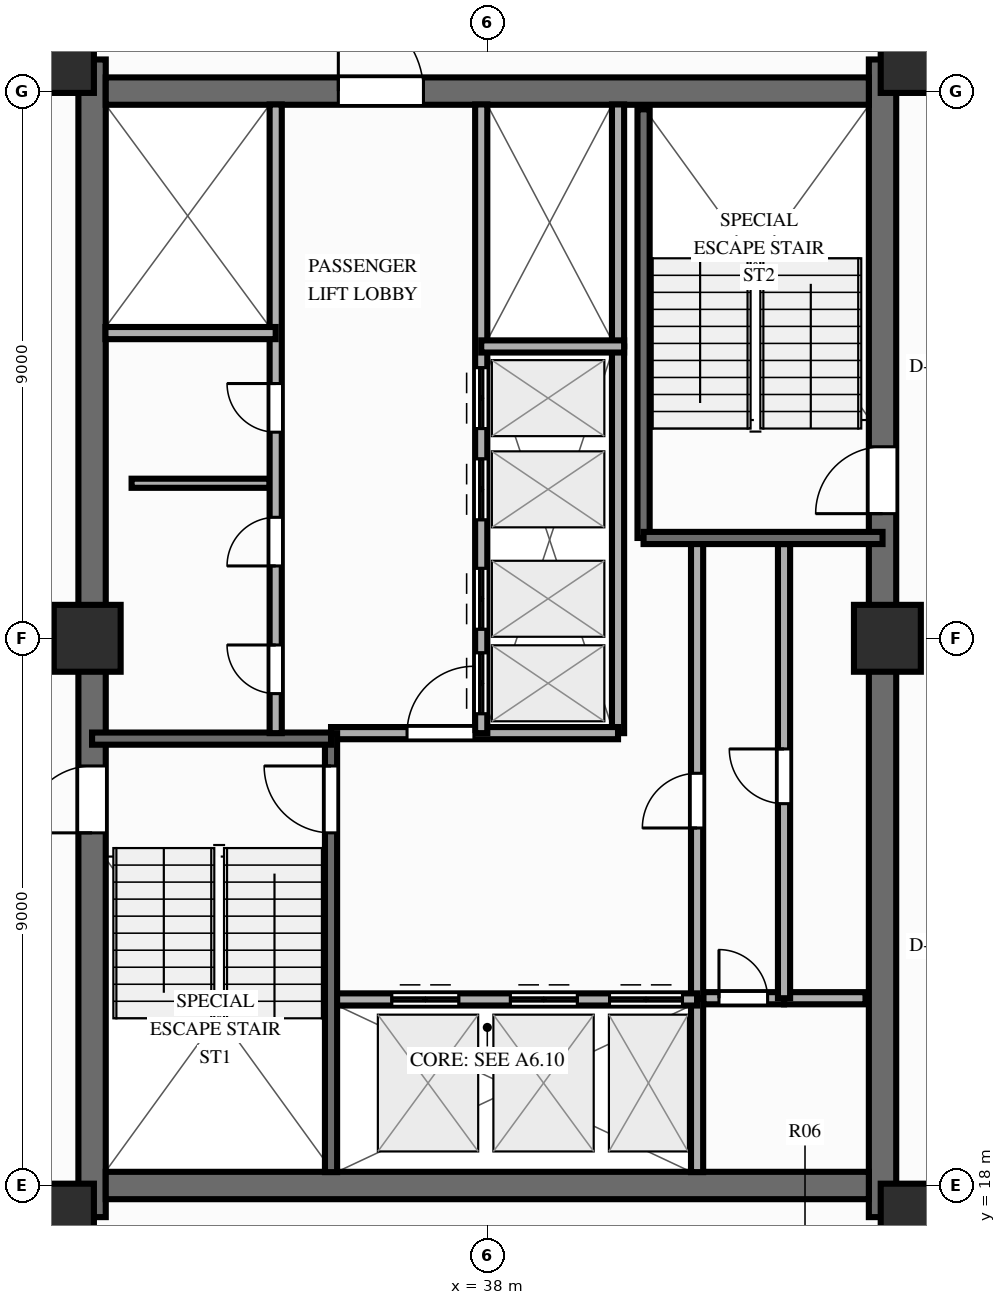
"""IFC4 building model, lengths in metres.
Left out: names, types, materials, properties, quantities, classifications, styles, units other than length and angle.
Written with IfcOpenShell. Run it as: python <this file> out.ifc"""

import sys

from ifc_helpers import new_model, si_unit, direction, frame, frame_2d, origin, origin_2d, place, context, subcontext, project, spatial, rectangle, extrude, source, transform, mapped, element, fill, save


model = new_model("IFC4")
c1 = context("Model", 3, precision=1e-05, world=origin(), true_north=direction((0.0, 1.0)))
c2 = subcontext(c1, "Body", "Model", "MODEL_VIEW")
j1 = project(units=[si_unit("LENGTHUNIT", "METRE"), si_unit("PLANEANGLEUNIT", "RADIAN")], contexts=[c1])
p1 = place(None, origin())
s1 = spatial("IfcSite", under=j1, at=p1, CompositionType="ELEMENT")
p2 = place(p1, origin())
s2 = spatial("IfcBuilding", under=s1, at=p2, CompositionType="ELEMENT")
p3 = place(p2, frame((0.0, 0.0, 159.1)))
s3 = spatial("IfcBuildingStorey", under=s2, at=p3, CompositionType="ELEMENT", Elevation=159.1)
p4 = place(p3, frame((31.5, 17.48, 0.0), z_axis=(0.0, 0.0, 1.0), x_axis=(0.0, 1.0, 0.0)))
e1 = element("IfcWall", 1, at=p4, inside=s3, PredefinedType="SHEAR", context=c2, shape_type="SweptSolid", body=[
    extrude(rectangle(XDim=19.04, YDim=0.45, at=frame_2d((9.52, 0.0))), origin(), (0.0, 0.0, 1.0), 3.9),
])
p5 = place(p4, frame((6.32, 0.0, 0.0)))
e2 = element("IfcOpeningElement", 2, at=p5, cuts=e1, PredefinedType="OPENING", context=c2, shape_type="SweptSolid", body=[
    extrude(rectangle(XDim=1.1, YDim=2.15, at=frame_2d((0.55, 1.075))), frame((0.0, 0.237, 0.0), z_axis=(0.0, -1.0, 0.0), x_axis=(1.0, 0.0, 0.0)), (0.0, 0.0, 1.0), 0.474),
])
p6 = place(p3, frame((44.5, 17.48, 0.0), z_axis=(0.0, 0.0, 1.0), x_axis=(0.0, 1.0, 0.0)))
e3 = element("IfcWall", 3, at=p6, inside=s3, PredefinedType="SHEAR", context=c2, shape_type="SweptSolid", body=[
    extrude(rectangle(XDim=19.04, YDim=0.45, at=frame_2d((9.52, 0.0))), origin(), (0.0, 0.0, 1.0), 3.9),
])
p7 = place(p6, frame((12.67, 0.0, 0.0), z_axis=(0.0, 0.0, 1.0), x_axis=(-1.0, 0.0, 0.0)))
e4 = element("IfcOpeningElement", 4, at=p7, cuts=e3, PredefinedType="OPENING", context=c2, shape_type="SweptSolid", body=[
    extrude(rectangle(XDim=1.1, YDim=2.15, at=frame_2d((0.55, 1.075))), frame((0.0, 0.237, 0.0), z_axis=(0.0, -1.0, 0.0), x_axis=(1.0, 0.0, 0.0)), (0.0, 0.0, 1.0), 0.474),
])
p8 = place(p3, frame((31.725, 18.0, 0.0), z_axis=(0.0, 0.0, 1.0), x_axis=(1.0, 0.0, 0.0)))
e5 = element("IfcWall", 5, at=p8, inside=s3, PredefinedType="SHEAR", context=c2, shape_type="SweptSolid", body=[
    extrude(rectangle(XDim=12.55, YDim=0.45, at=frame_2d((6.275, 0.0))), origin(), (0.0, 0.0, 1.0), 3.9),
])
p9 = place(p3, frame((31.725, 36.0, 0.0), z_axis=(0.0, 0.0, 1.0), x_axis=(1.0, 0.0, 0.0)))
e6 = element("IfcWall", 6, at=p9, inside=s3, PredefinedType="SHEAR", context=c2, shape_type="SweptSolid", body=[
    extrude(rectangle(XDim=12.55, YDim=0.45, at=frame_2d((6.275, 0.0))), origin(), (0.0, 0.0, 1.0), 3.9),
])
p10 = place(p9, frame((5.225, 0.0, 0.0), z_axis=(0.0, 0.0, 1.0), x_axis=(-1.0, 0.0, 0.0)))
e7 = element("IfcOpeningElement", 7, at=p10, cuts=e6, PredefinedType="OPENING", context=c2, shape_type="SweptSolid", body=[
    extrude(rectangle(XDim=1.4, YDim=2.15, at=frame_2d((0.7, 1.075))), frame((0.0, 0.237, 0.0), z_axis=(0.0, -1.0, 0.0), x_axis=(1.0, 0.0, 0.0)), (0.0, 0.0, 1.0), 0.474),
])
m1 = source(origin(), c2, "Body", "SweptSolid", [
    extrude(rectangle(XDim=1.1, YDim=1.1, at=origin_2d()), origin(), (0.0, 0.0, 1.0), 3.9),
])
for number, where, z_axis, x_axis in (
    (8, (30.98, 17.48, 0.0), (0.0, 0.0, 1.0), (1.0, 0.0, 0.0)),
    (9, (45.02, 17.48, 0.0), (0.0, 0.0, 1.0), (1.0, 0.0, 0.0)),
    (10, (30.98, 36.52, 0.0), (0.0, 0.0, 1.0), (1.0, 0.0, 0.0)),
    (11, (45.02, 36.52, 0.0), (0.0, 0.0, 1.0), (1.0, 0.0, 0.0)),
    (12, (31.42, 27.0, 0.0), (0.0, 0.0, 1.0), (1.0, 0.0, 0.0)),
    (13, (44.58, 27.0, 0.0), (0.0, 0.0, 1.0), (1.0, 0.0, 0.0)),
):
    element("IfcColumn", number, at=place(p3, frame(where, z_axis=z_axis, x_axis=x_axis)), inside=s3, PredefinedType="COLUMN", context=c2, shape_type="MappedRepresentation", body=[
        mapped(m1, transform((0.0, 0.0, 0.0), scale=1.0)),
    ])
p11 = place(p3, frame((32.15, 29.55, 0.0), z_axis=(0.0, 0.0, 1.0), x_axis=(1.0, 0.0, 0.0)))
e14 = element("IfcWall", 14, at=p11, inside=s3, PredefinedType="PARTITIONING", context=c2, shape_type="SweptSolid", body=[
    extrude(rectangle(XDim=2.27, YDim=0.15, at=frame_2d((1.135, 0.0))), origin(), (0.0, 0.0, 1.0), 3.69),
])
p12 = place(p3, frame((41.55, 21.08, 0.0), z_axis=(0.0, 0.0, 1.0), x_axis=(1.0, 0.0, 0.0)))
e15 = element("IfcWall", 15, at=p12, inside=s3, PredefinedType="PARTITIONING", context=c2, shape_type="SweptSolid", body=[
    extrude(rectangle(XDim=1.33, YDim=0.2, at=frame_2d((0.665, 0.0))), origin(), (0.0, 0.0, 1.0), 3.69),
])
p13 = place(p12, frame((0.26, 0.0, 0.0)))
e16 = element("IfcOpeningElement", 16, at=p13, cuts=e15, PredefinedType="OPENING", context=c2, shape_type="SweptSolid", body=[
    extrude(rectangle(XDim=0.8, YDim=2.05, at=frame_2d((0.4, 1.025))), frame((0.0, 0.112, 0.0), z_axis=(0.0, -1.0, 0.0), x_axis=(1.0, 0.0, 0.0)), (0.0, 0.0, 1.0), 0.224),
])
p14 = place(p3, frame((42.88, 21.08, 0.0), z_axis=(0.0, 0.0, 1.0), x_axis=(1.0, 0.0, 0.0)))
e17 = element("IfcWall", 17, at=p14, inside=s3, PredefinedType="PARTITIONING", context=c2, shape_type="SweptSolid", body=[
    extrude(rectangle(XDim=1.34, YDim=0.2, at=frame_2d((0.67, 0.0))), origin(), (0.0, 0.0, 1.0), 3.69),
])
p15 = place(p3, frame((42.88, 21.08, 0.0), z_axis=(0.0, 0.0, 1.0), x_axis=(0.0, 1.0, 0.0)))
e18 = element("IfcWall", 18, at=p15, inside=s3, PredefinedType="PARTITIONING", context=c2, shape_type="SweptSolid", body=[
    extrude(rectangle(XDim=7.47, YDim=0.2, at=frame_2d((3.735, 0.0))), origin(), (0.0, 0.0, 1.0), 3.69),
])
p16 = place(p15, frame((3.2, 0.0, 0.0)))
e19 = element("IfcOpeningElement", 19, at=p16, cuts=e18, PredefinedType="OPENING", context=c2, shape_type="SweptSolid", body=[
    extrude(rectangle(XDim=0.9, YDim=2.1, at=frame_2d((0.45, 1.05))), frame((0.0, 0.112, 0.0), z_axis=(0.0, -1.0, 0.0), x_axis=(1.0, 0.0, 0.0)), (0.0, 0.0, 1.0), 0.224),
])
p17 = place(p3, frame((41.45, 18.22, 0.0), z_axis=(0.0, 0.0, 1.0), x_axis=(0.0, 1.0, 0.0)))
e20 = element("IfcWall", 20, at=p17, inside=s3, PredefinedType="PARTITIONING", context=c2, shape_type="SweptSolid", body=[
    extrude(rectangle(XDim=2.86, YDim=0.2, at=frame_2d((1.43, 0.0))), origin(), (0.0, 0.0, 1.0), 3.69),
])
p18 = place(p3, frame((41.45, 21.08, 0.0), z_axis=(0.0, 0.0, 1.0), x_axis=(0.0, 1.0, 0.0)))
e21 = element("IfcWall", 21, at=p18, inside=s3, PredefinedType="PARTITIONING", context=c2, shape_type="SweptSolid", body=[
    extrude(rectangle(XDim=7.52, YDim=0.2, at=frame_2d((3.76, 0.0))), origin(), (0.0, 0.0, 1.0), 3.69),
])
p19 = place(p18, frame((2.8, 0.0, 0.0)))
e22 = element("IfcOpeningElement", 22, at=p19, cuts=e21, PredefinedType="OPENING", context=c2, shape_type="SweptSolid", body=[
    extrude(rectangle(XDim=0.9, YDim=2.1, at=frame_2d((0.45, 1.05))), frame((0.0, 0.112, 0.0), z_axis=(0.0, -1.0, 0.0), x_axis=(1.0, 0.0, 0.0)), (0.0, 0.0, 1.0), 0.224),
])
p20 = place(p3, frame((40.15, 25.44, 0.0), z_axis=(0.0, 0.0, 1.0), x_axis=(0.0, 1.0, 0.0)))
e23 = element("IfcWall", 23, at=p20, inside=s3, PredefinedType="PARTITIONING", context=c2, shape_type="SweptSolid", body=[
    extrude(rectangle(XDim=6.36, YDim=0.2, at=frame_2d((3.18, 0.0))), origin(), (0.0, 0.0, 1.0), 3.69),
])
p21 = place(p3, frame((40.15, 31.8, 0.0), z_axis=(0.0, 0.0, 1.0), x_axis=(0.0, 1.0, 0.0)))
e24 = element("IfcWall", 24, at=p21, inside=s3, PredefinedType="PARTITIONING", context=c2, shape_type="SweptSolid", body=[
    extrude(rectangle(XDim=3.98, YDim=0.2, at=frame_2d((1.99, 0.0))), origin(), (0.0, 0.0, 1.0), 3.69),
])
p22 = place(p3, frame((35.43, 21.06, 0.0), z_axis=(0.0, 0.0, 1.0), x_axis=(1.0, 0.0, 0.0)))
e25 = element("IfcWall", 25, at=p22, inside=s3, PredefinedType="PARTITIONING", context=c2, shape_type="SweptSolid", body=[
    extrude(rectangle(XDim=6.02, YDim=0.2, at=frame_2d((3.01, 0.0))), origin(), (0.0, 0.0, 1.0), 3.69),
])
p23 = place(p22, frame((1.0, 0.0, 0.0)))
e26 = element("IfcOpeningElement", 26, at=p23, cuts=e25, PredefinedType="OPENING", context=c2, shape_type="SweptSolid", body=[
    extrude(rectangle(XDim=1.1, YDim=2.15, at=frame_2d((0.55, 1.075))), frame((0.0, 0.112, 0.0), z_axis=(0.0, -1.0, 0.0), x_axis=(1.0, 0.0, 0.0)), (0.0, 0.0, 1.0), 0.224),
])
p24 = place(p22, frame((2.95, 0.0, 0.0)))
e27 = element("IfcOpeningElement", 27, at=p24, cuts=e25, PredefinedType="OPENING", context=c2, shape_type="SweptSolid", body=[
    extrude(rectangle(XDim=1.1, YDim=2.15, at=frame_2d((0.55, 1.075))), frame((0.0, 0.112, 0.0), z_axis=(0.0, -1.0, 0.0), x_axis=(1.0, 0.0, 0.0)), (0.0, 0.0, 1.0), 0.224),
])
p25 = place(p22, frame((4.58, 0.0, 0.0)))
e28 = element("IfcOpeningElement", 28, at=p25, cuts=e25, PredefinedType="OPENING", context=c2, shape_type="SweptSolid", body=[
    extrude(rectangle(XDim=1.2, YDim=2.15, at=frame_2d((0.6, 1.075))), frame((0.0, 0.112, 0.0), z_axis=(0.0, -1.0, 0.0), x_axis=(1.0, 0.0, 0.0)), (0.0, 0.0, 1.0), 0.224),
])
p26 = place(p3, frame((35.43, 25.44, 0.0), z_axis=(0.0, 0.0, 1.0), x_axis=(1.0, 0.0, 0.0)))
e29 = element("IfcWall", 29, at=p26, inside=s3, PredefinedType="PARTITIONING", context=c2, shape_type="SweptSolid", body=[
    extrude(rectangle(XDim=4.72, YDim=0.2, at=frame_2d((2.36, 0.0))), origin(), (0.0, 0.0, 1.0), 3.69),
])
p27 = place(p26, frame((1.25, 0.0, 0.0)))
e30 = element("IfcOpeningElement", 30, at=p27, cuts=e29, PredefinedType="OPENING", context=c2, shape_type="SweptSolid", body=[
    extrude(rectangle(XDim=1.1, YDim=2.15, at=frame_2d((0.55, 1.075))), frame((0.0, 0.112, 0.0), z_axis=(0.0, -1.0, 0.0), x_axis=(1.0, 0.0, 0.0)), (0.0, 0.0, 1.0), 0.224),
])
p28 = place(p3, frame((35.43, 18.22, 0.0), z_axis=(0.0, 0.0, 1.0), x_axis=(0.0, 1.0, 0.0)))
e31 = element("IfcWall", 31, at=p28, inside=s3, PredefinedType="SOLIDWALL", context=c2, shape_type="SweptSolid", body=[
    extrude(rectangle(XDim=7.22, YDim=0.2, at=frame_2d((3.61, 0.0))), origin(), (0.0, 0.0, 1.0), 3.69),
])
p29 = place(p28, frame((6.68, 0.0, 0.0), z_axis=(0.0, 0.0, 1.0), x_axis=(-1.0, 0.0, 0.0)))
e32 = element("IfcOpeningElement", 32, at=p29, cuts=e31, PredefinedType="OPENING", context=c2, shape_type="SweptSolid", body=[
    extrude(rectangle(XDim=1.1, YDim=2.15, at=frame_2d((0.55, 1.075))), frame((0.0, 0.112, 0.0), z_axis=(0.0, -1.0, 0.0), x_axis=(1.0, 0.0, 0.0)), (0.0, 0.0, 1.0), 0.224),
])
p30 = place(p3, frame((31.5, 25.35, 0.0), z_axis=(0.0, 0.0, 1.0), x_axis=(1.0, 0.0, 0.0)))
e33 = element("IfcWall", 33, at=p30, inside=s3, PredefinedType="SOLIDWALL", context=c2, shape_type="SweptSolid", body=[
    extrude(rectangle(XDim=3.93, YDim=0.2, at=frame_2d((1.965, 0.0))), origin(), (0.0, 0.0, 1.0), 3.69),
])
p31 = place(p3, frame((40.57, 28.65, 0.0), z_axis=(0.0, 0.0, 1.0), x_axis=(0.0, 1.0, 0.0)))
e34 = element("IfcWall", 34, at=p31, inside=s3, PredefinedType="SOLIDWALL", context=c2, shape_type="SweptSolid", body=[
    extrude(rectangle(XDim=7.05, YDim=0.2, at=frame_2d((3.525, 0.0))), origin(), (0.0, 0.0, 1.0), 3.69),
])
p32 = place(p3, frame((40.57, 28.65, 0.0), z_axis=(0.0, 0.0, 1.0), x_axis=(1.0, 0.0, 0.0)))
e35 = element("IfcWall", 35, at=p32, inside=s3, PredefinedType="SOLIDWALL", context=c2, shape_type="SweptSolid", body=[
    extrude(rectangle(XDim=3.93, YDim=0.2, at=frame_2d((1.965, 0.0))), origin(), (0.0, 0.0, 1.0), 3.69),
])
p33 = place(p3, frame((34.52, 25.44, 0.0), z_axis=(0.0, 0.0, 1.0), x_axis=(0.0, 1.0, 0.0)))
e36 = element("IfcWall", 36, at=p33, inside=s3, PredefinedType="PARTITIONING", context=c2, shape_type="SweptSolid", body=[
    extrude(rectangle(XDim=10.34, YDim=0.2, at=frame_2d((5.17, 0.0))), origin(), (0.0, 0.0, 1.0), 3.69),
])
p34 = place(p33, frame((0.65, 0.0, 0.0)))
e37 = element("IfcOpeningElement", 37, at=p34, cuts=e36, PredefinedType="OPENING", context=c2, shape_type="SweptSolid", body=[
    extrude(rectangle(XDim=0.8, YDim=2.05, at=frame_2d((0.4, 1.025))), frame((0.0, 0.112, 0.0), z_axis=(0.0, -1.0, 0.0), x_axis=(1.0, 0.0, 0.0)), (0.0, 0.0, 1.0), 0.224),
])
p35 = place(p33, frame((2.75, 0.0, 0.0)))
e38 = element("IfcOpeningElement", 38, at=p35, cuts=e36, PredefinedType="OPENING", context=c2, shape_type="SweptSolid", body=[
    extrude(rectangle(XDim=0.8, YDim=2.05, at=frame_2d((0.4, 1.025))), frame((0.0, 0.112, 0.0), z_axis=(0.0, -1.0, 0.0), x_axis=(1.0, 0.0, 0.0)), (0.0, 0.0, 1.0), 0.224),
])
p36 = place(p33, frame((4.95, 0.0, 0.0)))
e39 = element("IfcOpeningElement", 39, at=p36, cuts=e36, PredefinedType="OPENING", context=c2, shape_type="SweptSolid", body=[
    extrude(rectangle(XDim=0.8, YDim=2.05, at=frame_2d((0.4, 1.025))), frame((0.0, 0.112, 0.0), z_axis=(0.0, -1.0, 0.0), x_axis=(1.0, 0.0, 0.0)), (0.0, 0.0, 1.0), 0.224),
])
p37 = place(p3, frame((31.72, 32.02, 0.0), z_axis=(0.0, 0.0, 1.0), x_axis=(1.0, 0.0, 0.0)))
e40 = element("IfcWall", 40, at=p37, inside=s3, PredefinedType="PARTITIONING", context=c2, shape_type="SweptSolid", body=[
    extrude(rectangle(XDim=2.8, YDim=0.2, at=frame_2d((1.4, 0.0))), origin(), (0.0, 0.0, 1.0), 3.69),
])
p38 = place(p3, frame((37.9, 25.44, 0.0), z_axis=(0.0, 0.0, 1.0), x_axis=(0.0, 1.0, 0.0)))
e41 = element("IfcWall", 41, at=p38, inside=s3, PredefinedType="PARTITIONING", context=c2, shape_type="SweptSolid", body=[
    extrude(rectangle(XDim=10.34, YDim=0.2, at=frame_2d((5.17, 0.0))), origin(), (0.0, 0.0, 1.0), 3.69),
])
p39 = place(p38, frame((0.32, 0.0, 0.0)))
e42 = element("IfcOpeningElement", 42, at=p39, cuts=e41, PredefinedType="OPENING", context=c2, shape_type="SweptSolid", body=[
    extrude(rectangle(XDim=1.0, YDim=2.15, at=frame_2d((0.5, 1.075))), frame((0.0, 0.112, 0.0), z_axis=(0.0, -1.0, 0.0), x_axis=(1.0, 0.0, 0.0)), (0.0, 0.0, 1.0), 0.224),
])
p40 = place(p38, frame((1.71, 0.0, 0.0)))
e43 = element("IfcOpeningElement", 43, at=p40, cuts=e41, PredefinedType="OPENING", context=c2, shape_type="SweptSolid", body=[
    extrude(rectangle(XDim=1.0, YDim=2.15, at=frame_2d((0.5, 1.075))), frame((0.0, 0.112, 0.0), z_axis=(0.0, -1.0, 0.0), x_axis=(1.0, 0.0, 0.0)), (0.0, 0.0, 1.0), 0.224),
])
p41 = place(p38, frame((3.51, 0.0, 0.0)))
e44 = element("IfcOpeningElement", 44, at=p41, cuts=e41, PredefinedType="OPENING", context=c2, shape_type="SweptSolid", body=[
    extrude(rectangle(XDim=1.0, YDim=2.15, at=frame_2d((0.5, 1.075))), frame((0.0, 0.112, 0.0), z_axis=(0.0, -1.0, 0.0), x_axis=(1.0, 0.0, 0.0)), (0.0, 0.0, 1.0), 0.224),
])
p42 = place(p38, frame((5.01, 0.0, 0.0)))
e45 = element("IfcOpeningElement", 45, at=p42, cuts=e41, PredefinedType="OPENING", context=c2, shape_type="SweptSolid", body=[
    extrude(rectangle(XDim=1.0, YDim=2.15, at=frame_2d((0.5, 1.075))), frame((0.0, 0.112, 0.0), z_axis=(0.0, -1.0, 0.0), x_axis=(1.0, 0.0, 0.0)), (0.0, 0.0, 1.0), 0.224),
])
p43 = place(p3, frame((37.9, 31.8, 0.0), z_axis=(0.0, 0.0, 1.0), x_axis=(1.0, 0.0, 0.0)))
e46 = element("IfcWall", 46, at=p43, inside=s3, PredefinedType="PARTITIONING", context=c2, shape_type="SweptSolid", body=[
    extrude(rectangle(XDim=2.35, YDim=0.2, at=frame_2d((1.175, 0.0))), origin(), (0.0, 0.0, 1.0), 3.69),
])
m2 = source(origin(), c2, "Body", "SweptSolid", [
    extrude(rectangle(XDim=1.1, YDim=2.15, at=frame_2d((0.55, 1.075))), frame((0.0, 0.025, 0.0), z_axis=(0.0, -1.0, 0.0), x_axis=(1.0, 0.0, 0.0)), (0.0, 0.0, 1.0), 0.05),
])
p44 = place(p5, origin())
e47 = element("IfcDoor", 47, at=p44, inside=s3, OperationType="SINGLE_SWING_LEFT", PredefinedType="DOOR", context=c2, shape_type="MappedRepresentation", body=[
    mapped(m2, transform((0.0, 0.0, 0.0), scale=1.0)),
])
fill(e2, e47)
p45 = place(p7, origin())
e48 = element("IfcDoor", 48, at=p45, inside=s3, OperationType="SINGLE_SWING_RIGHT", PredefinedType="DOOR", context=c2, shape_type="MappedRepresentation", body=[
    mapped(m2, transform((0.0, 0.0, 0.0), scale=1.0)),
])
fill(e4, e48)
m3 = source(origin(), c2, "Body", "SweptSolid", [
    extrude(rectangle(XDim=1.4, YDim=2.15, at=frame_2d((0.7, 1.075))), frame((0.0, 0.025, 0.0), z_axis=(0.0, -1.0, 0.0), x_axis=(1.0, 0.0, 0.0)), (0.0, 0.0, 1.0), 0.05),
])
p46 = place(p10, origin())
e49 = element("IfcDoor", 49, at=p46, inside=s3, OperationType="SINGLE_SWING_RIGHT", PredefinedType="DOOR", context=c2, shape_type="MappedRepresentation", body=[
    mapped(m3, transform((0.0, 0.0, 0.0), scale=1.0)),
])
fill(e7, e49)
m4 = source(origin(), c2, "Body", "SweptSolid", [
    extrude(rectangle(XDim=0.8, YDim=2.05, at=frame_2d((0.4, 1.025))), frame((0.0, 0.025, 0.0), z_axis=(0.0, -1.0, 0.0), x_axis=(1.0, 0.0, 0.0)), (0.0, 0.0, 1.0), 0.05),
])
p47 = place(p13, origin())
e50 = element("IfcDoor", 50, at=p47, inside=s3, OperationType="SINGLE_SWING_LEFT", PredefinedType="DOOR", context=c2, shape_type="MappedRepresentation", body=[
    mapped(m4, transform((0.0, 0.0, 0.0), scale=1.0)),
])
fill(e16, e50)
m5 = source(origin(), c2, "Body", "SweptSolid", [
    extrude(rectangle(XDim=0.9, YDim=2.1, at=frame_2d((0.45, 1.05))), frame((0.0, 0.025, 0.0), z_axis=(0.0, -1.0, 0.0), x_axis=(1.0, 0.0, 0.0)), (0.0, 0.0, 1.0), 0.05),
])
p48 = place(p16, origin())
e51 = element("IfcDoor", 51, at=p48, inside=s3, OperationType="SINGLE_SWING_RIGHT", PredefinedType="DOOR", context=c2, shape_type="MappedRepresentation", body=[
    mapped(m5, transform((0.0, 0.0, 0.0), scale=1.0)),
])
fill(e19, e51)
p49 = place(p19, origin())
e52 = element("IfcDoor", 52, at=p49, inside=s3, OperationType="SINGLE_SWING_LEFT", PredefinedType="DOOR", context=c2, shape_type="MappedRepresentation", body=[
    mapped(m5, transform((0.0, 0.0, 0.0), scale=1.0)),
])
fill(e22, e52)
p50 = place(p23, origin())
e53 = element("IfcDoor", 53, at=p50, inside=s3, OperationType="DOUBLE_DOOR_SLIDING", PredefinedType="DOOR", context=c2, shape_type="MappedRepresentation", body=[
    mapped(m2, transform((0.0, 0.0, 0.0), scale=1.0)),
])
fill(e26, e53)
p51 = place(p24, origin())
e54 = element("IfcDoor", 54, at=p51, inside=s3, OperationType="DOUBLE_DOOR_SLIDING", PredefinedType="DOOR", context=c2, shape_type="MappedRepresentation", body=[
    mapped(m2, transform((0.0, 0.0, 0.0), scale=1.0)),
])
fill(e27, e54)
m6 = source(origin(), c2, "Body", "SweptSolid", [
    extrude(rectangle(XDim=1.2, YDim=2.15, at=frame_2d((0.6, 1.075))), frame((0.0, 0.025, 0.0), z_axis=(0.0, -1.0, 0.0), x_axis=(1.0, 0.0, 0.0)), (0.0, 0.0, 1.0), 0.05),
])
p52 = place(p25, origin())
e55 = element("IfcDoor", 55, at=p52, inside=s3, OperationType="DOUBLE_DOOR_SLIDING", PredefinedType="DOOR", context=c2, shape_type="MappedRepresentation", body=[
    mapped(m6, transform((0.0, 0.0, 0.0), scale=1.0)),
])
fill(e28, e55)
p53 = place(p27, origin())
e56 = element("IfcDoor", 56, at=p53, inside=s3, OperationType="SINGLE_SWING_RIGHT", PredefinedType="DOOR", context=c2, shape_type="MappedRepresentation", body=[
    mapped(m2, transform((0.0, 0.0, 0.0), scale=1.0)),
])
fill(e30, e56)
p54 = place(p29, origin())
e57 = element("IfcDoor", 57, at=p54, inside=s3, OperationType="SINGLE_SWING_LEFT", PredefinedType="DOOR", context=c2, shape_type="MappedRepresentation", body=[
    mapped(m2, transform((0.0, 0.0, 0.0), scale=1.0)),
])
fill(e32, e57)
p55 = place(p34, origin())
e58 = element("IfcDoor", 58, at=p55, inside=s3, OperationType="SINGLE_SWING_RIGHT", PredefinedType="DOOR", context=c2, shape_type="MappedRepresentation", body=[
    mapped(m4, transform((0.0, 0.0, 0.0), scale=1.0)),
])
fill(e37, e58)
p56 = place(p35, origin())
e59 = element("IfcDoor", 59, at=p56, inside=s3, OperationType="SINGLE_SWING_LEFT", PredefinedType="DOOR", context=c2, shape_type="MappedRepresentation", body=[
    mapped(m4, transform((0.0, 0.0, 0.0), scale=1.0)),
])
fill(e38, e59)
p57 = place(p36, origin())
e60 = element("IfcDoor", 60, at=p57, inside=s3, OperationType="SINGLE_SWING_RIGHT", PredefinedType="DOOR", context=c2, shape_type="MappedRepresentation", body=[
    mapped(m4, transform((0.0, 0.0, 0.0), scale=1.0)),
])
fill(e39, e60)
m7 = source(origin(), c2, "Body", "SweptSolid", [
    extrude(rectangle(XDim=1.0, YDim=2.15, at=frame_2d((0.5, 1.075))), frame((0.0, 0.025, 0.0), z_axis=(0.0, -1.0, 0.0), x_axis=(1.0, 0.0, 0.0)), (0.0, 0.0, 1.0), 0.05),
])
p58 = place(p39, origin())
e61 = element("IfcDoor", 61, at=p58, inside=s3, OperationType="DOUBLE_DOOR_SLIDING", PredefinedType="DOOR", context=c2, shape_type="MappedRepresentation", body=[
    mapped(m7, transform((0.0, 0.0, 0.0), scale=1.0)),
])
fill(e42, e61)
p59 = place(p40, origin())
e62 = element("IfcDoor", 62, at=p59, inside=s3, OperationType="DOUBLE_DOOR_SLIDING", PredefinedType="DOOR", context=c2, shape_type="MappedRepresentation", body=[
    mapped(m7, transform((0.0, 0.0, 0.0), scale=1.0)),
])
fill(e43, e62)
p60 = place(p41, origin())
e63 = element("IfcDoor", 63, at=p60, inside=s3, OperationType="DOUBLE_DOOR_SLIDING", PredefinedType="DOOR", context=c2, shape_type="MappedRepresentation", body=[
    mapped(m7, transform((0.0, 0.0, 0.0), scale=1.0)),
])
fill(e44, e63)
p61 = place(p42, origin())
e64 = element("IfcDoor", 64, at=p61, inside=s3, OperationType="DOUBLE_DOOR_SLIDING", PredefinedType="DOOR", context=c2, shape_type="MappedRepresentation", body=[
    mapped(m7, transform((0.0, 0.0, 0.0), scale=1.0)),
])
fill(e45, e64)
save(model, sys.argv[1])
